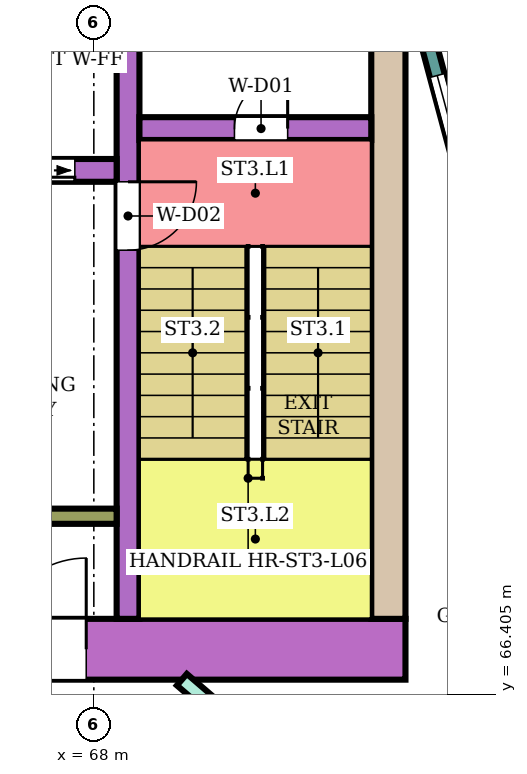
"""IFC4 building model, lengths in metres.
Left out: names, types, materials, properties, quantities, classifications, styles, units other than length and angle.
Written with IfcOpenShell. Run it as: python <this file> out.ifc"""

import sys

from ifc_helpers import new_model, si_unit, direction, frame, frame_2d, origin, place, context, subcontext, project, spatial, rectangle, extrude, element, fill, save


model = new_model("IFC4")
c1 = context("Model", 3, precision=1e-05, world=origin(), true_north=direction((0.0, 1.0)))
c2 = subcontext(c1, "Body", "Model", "MODEL_VIEW")
j1 = project(units=[si_unit("LENGTHUNIT", "METRE"), si_unit("PLANEANGLEUNIT", "RADIAN")], contexts=[c1])
p1 = place(None, origin())
s1 = spatial("IfcSite", under=j1, at=p1, CompositionType="ELEMENT")
p2 = place(p1, origin())
s2 = spatial("IfcBuilding", under=s1, at=p2, CompositionType="ELEMENT")
p3 = place(p2, frame((0.0, 0.0, 32.6)))
s3 = spatial("IfcBuildingStorey", under=s2, at=p3, CompositionType="ELEMENT", Elevation=32.6)
p4 = place(p3, frame((72.1, 67.0, 0.0), z_axis=(0.0, 0.0, 1.0), x_axis=(-1.0, 0.0, 0.0)))
e1 = element("IfcWall", 1, at=p4, inside=s3, PredefinedType="SHEAR", context=c2, shape_type="SweptSolid", body=[
    extrude(rectangle(XDim=14.7, YDim=0.8, at=frame_2d((7.35, 0.0))), origin(), (0.0, 0.0, 1.0), 3.48),
])
p5 = place(p4, frame((4.2, 0.0, 0.0)))
e2 = element("IfcOpeningElement", 2, at=p5, cuts=e1, PredefinedType="OPENING", context=c2, shape_type="SweptSolid", body=[
    extrude(rectangle(XDim=2.4, YDim=2.4, at=frame_2d((1.2, 1.2))), frame((0.0, 0.41, 0.0), z_axis=(0.0, -1.0, 0.0), x_axis=(1.0, 0.0, 0.0)), (0.0, 0.0, 1.0), 0.82),
])
p6 = place(p3, frame((71.875, 75.0, 0.0), z_axis=(0.0, 0.0, 1.0), x_axis=(0.0, -1.0, 0.0)))
e3 = element("IfcWall", 3, at=p6, inside=s3, PredefinedType="SHEAR", context=c2, shape_type="SweptSolid", body=[
    extrude(rectangle(XDim=7.6, YDim=0.45, at=frame_2d((3.8, 0.0))), origin(), (0.0, 0.0, 1.0), 3.48),
])
p7 = place(p3, frame((68.45, 75.0, 0.0), z_axis=(0.0, 0.0, 1.0), x_axis=(0.0, -1.0, 0.0)))
e4 = element("IfcWall", 4, at=p7, inside=s3, PredefinedType="SHEAR", context=c2, shape_type="SweptSolid", body=[
    extrude(rectangle(XDim=7.6, YDim=0.3, at=frame_2d((3.8, 0.0))), origin(), (0.0, 0.0, 1.0), 3.48),
])
p8 = place(p7, frame((1.85, 0.0, 0.0)))
e5 = element("IfcOpeningElement", 5, at=p8, cuts=e4, PredefinedType="OPENING", context=c2, shape_type="SweptSolid", body=[
    extrude(rectangle(XDim=0.9, YDim=2.1, at=frame_2d((0.45, 1.05))), frame((0.0, 0.16, 0.0), z_axis=(0.0, -1.0, 0.0), x_axis=(1.0, 0.0, 0.0)), (0.0, 0.0, 1.0), 0.32),
])
p9 = place(p3, frame((71.65, 73.85, 0.0), z_axis=(0.0, 0.0, 1.0), x_axis=(-1.0, 0.0, 0.0)))
e6 = element("IfcWall", 6, at=p9, inside=s3, PredefinedType="SHEAR", context=c2, shape_type="SweptSolid", body=[
    extrude(rectangle(XDim=3.05, YDim=0.3, at=frame_2d((1.525, 0.0))), origin(), (0.0, 0.0, 1.0), 3.48),
])
p10 = place(p9, frame((1.1, 0.0, 0.0)))
e7 = element("IfcOpeningElement", 7, at=p10, cuts=e6, PredefinedType="OPENING", context=c2, shape_type="SweptSolid", body=[
    extrude(rectangle(XDim=0.7, YDim=2.0, at=frame_2d((0.35, 1.0))), frame((0.0, 0.16, 0.0), z_axis=(0.0, -1.0, 0.0), x_axis=(1.0, 0.0, 0.0)), (0.0, 0.0, 1.0), 0.32),
])
p11 = place(p3, frame((68.3, 73.3, 0.0), z_axis=(0.0, 0.0, 1.0), x_axis=(-1.0, 0.0, 0.0)))
e8 = element("IfcWall", 8, at=p11, inside=s3, PredefinedType="SHEAR", context=c2, shape_type="SweptSolid", body=[
    extrude(rectangle(XDim=10.9, YDim=0.3, at=frame_2d((5.45, 0.0))), origin(), (0.0, 0.0, 1.0), 3.48),
])
p12 = place(p11, frame((0.55, 0.0, 0.0)))
e9 = element("IfcOpeningElement", 9, at=p12, cuts=e8, PredefinedType="OPENING", context=c2, shape_type="SweptSolid", body=[
    extrude(rectangle(XDim=1.1, YDim=2.1, at=frame_2d((0.55, 1.05))), frame((0.0, 0.16, 0.0), z_axis=(0.0, -1.0, 0.0), x_axis=(1.0, 0.0, 0.0)), (0.0, 0.0, 1.0), 0.32),
])
p13 = place(p11, frame((8.1, 0.0, 0.0)))
e10 = element("IfcOpeningElement", 10, at=p13, cuts=e8, PredefinedType="OPENING", context=c2, shape_type="SweptSolid", body=[
    extrude(rectangle(XDim=1.0, YDim=2.1, at=frame_2d((0.5, 1.05))), frame((0.0, 0.16, 0.0), z_axis=(0.0, -1.0, 0.0), x_axis=(1.0, 0.0, 0.0)), (0.0, 0.0, 1.0), 0.32),
])
p14 = place(p3, frame((68.3, 68.75, 0.0), z_axis=(0.0, 0.0, 1.0), x_axis=(-1.0, 0.0, 0.0)))
e11 = element("IfcWall", 11, at=p14, inside=s3, PredefinedType="SHEAR", context=c2, shape_type="SweptSolid", body=[
    extrude(rectangle(XDim=4.65, YDim=0.2, at=frame_2d((2.325, 0.0))), origin(), (0.0, 0.0, 1.0), 3.48),
])
p15 = place(p3, frame((72.396, 75.0, 0.0), z_axis=(0.0, 0.0, 1.0), x_axis=(0.258789828301, -0.965933654434, 0.0)))
e12 = element("IfcWall", 12, at=p15, inside=s3, PredefinedType="NOTDEFINED", context=c2, shape_type="SweptSolid", body=[
    extrude(rectangle(XDim=3.936, YDim=0.2, at=frame_2d((1.968, 0.0))), origin(), (0.0, 0.0, 1.0), 3.8),
])
p16 = place(p15, frame((0.468, 0.0, 0.9)))
e13 = element("IfcOpeningElement", 13, at=p16, cuts=e12, PredefinedType="OPENING", context=c2, shape_type="SweptSolid", body=[
    extrude(rectangle(XDim=3.0, YDim=2.3, at=frame_2d((1.5, 1.15))), frame((0.0, 0.11, 0.0), z_axis=(0.0, -1.0, 0.0), x_axis=(1.0, 0.0, 0.0)), (0.0, 0.0, 1.0), 0.22),
])
p17 = place(p3, frame((69.158, 66.6, 0.0), z_axis=(0.0, 0.0, 1.0), x_axis=(0.757976058094, -0.652282373943, 0.0)))
e14 = element("IfcWall", 14, at=p17, inside=s3, PredefinedType="PARTITIONING", context=c2, shape_type="SweptSolid", body=[
    extrude(rectangle(XDim=5.16, YDim=0.2, at=frame_2d((2.58, 0.0))), origin(), (0.0, 0.0, 1.0), 3.35),
])
p18 = place(p17, frame((1.6, 0.0, 0.0)))
e15 = element("IfcOpeningElement", 15, at=p18, cuts=e14, PredefinedType="OPENING", context=c2, shape_type="SweptSolid", body=[
    extrude(rectangle(XDim=1.0, YDim=2.1, at=frame_2d((0.5, 1.05))), frame((0.0, 0.11, 0.0), z_axis=(0.0, -1.0, 0.0), x_axis=(1.0, 0.0, 0.0)), (0.0, 0.0, 1.0), 0.22),
])
p19 = place(p3, frame((71.596, 64.635, 0.0), z_axis=(0.0, 0.0, 1.0), x_axis=(0.652285007511, 0.757973791748, 0.0)))
e16 = element("IfcWall", 16, at=p19, inside=s3, PredefinedType="PARTITIONING", context=c2, shape_type="SweptSolid", body=[
    extrude(rectangle(XDim=2.65, YDim=0.1, at=frame_2d((1.325, 0.0))), origin(), (0.0, 0.0, 1.0), 3.35),
])
p20 = place(p19, frame((0.6, 0.0, 0.0)))
e17 = element("IfcOpeningElement", 17, at=p20, cuts=e16, PredefinedType="OPENING", context=c2, shape_type="SweptSolid", body=[
    extrude(rectangle(XDim=0.8, YDim=2.1, at=frame_2d((0.4, 1.05))), frame((0.0, 0.06, 0.0), z_axis=(0.0, -1.0, 0.0), x_axis=(1.0, 0.0, 0.0)), (0.0, 0.0, 1.0), 0.12),
])
p21 = place(p16, origin())
e18 = element("IfcWindow", 18, at=p21, inside=s3, PartitioningType="SINGLE_PANEL", PredefinedType="WINDOW", context=c2, shape_type="SweptSolid", body=[
    extrude(rectangle(XDim=3.0, YDim=2.3, at=frame_2d((1.5, 1.15))), frame((0.0, 0.03, 0.0), z_axis=(0.0, -1.0, 0.0), x_axis=(1.0, 0.0, 0.0)), (0.0, 0.0, 1.0), 0.06),
])
fill(e13, e18)
p22 = place(p10, frame((0.7, 0.0, 0.0), z_axis=(0.0, 0.0, 1.0), x_axis=(-1.0, 0.0, 0.0)))
e19 = element("IfcDoor", 19, at=p22, inside=s3, OperationType="SINGLE_SWING_RIGHT", PredefinedType="DOOR", context=c2, shape_type="SweptSolid", body=[
    extrude(rectangle(XDim=0.7, YDim=2.0, at=frame_2d((0.35, 1.0))), frame((0.0, 0.025, 0.0), z_axis=(0.0, -1.0, 0.0), x_axis=(1.0, 0.0, 0.0)), (0.0, 0.0, 1.0), 0.05),
])
fill(e7, e19)
p23 = place(p8, origin())
e20 = element("IfcDoor", 20, at=p23, inside=s3, OperationType="SINGLE_SWING_LEFT", PredefinedType="DOOR", context=c2, shape_type="SweptSolid", body=[
    extrude(rectangle(XDim=0.9, YDim=2.1, at=frame_2d((0.45, 1.05))), frame((0.0, 0.025, 0.0), z_axis=(0.0, -1.0, 0.0), x_axis=(1.0, 0.0, 0.0)), (0.0, 0.0, 1.0), 0.05),
])
fill(e5, e20)
p24 = place(p12, origin())
e21 = element("IfcDoor", 21, at=p24, inside=s3, OperationType="DOUBLE_DOOR_SLIDING", PredefinedType="DOOR", context=c2, shape_type="SweptSolid", body=[
    extrude(rectangle(XDim=1.1, YDim=2.1, at=frame_2d((0.55, 1.05))), frame((0.0, 0.025, 0.0), z_axis=(0.0, -1.0, 0.0), x_axis=(1.0, 0.0, 0.0)), (0.0, 0.0, 1.0), 0.05),
])
fill(e9, e21)
p25 = place(p5, frame((2.4, 0.0, 0.0), z_axis=(0.0, 0.0, 1.0), x_axis=(-1.0, 0.0, 0.0)))
e22 = element("IfcDoor", 22, at=p25, inside=s3, OperationType="DOUBLE_DOOR_SINGLE_SWING", PredefinedType="DOOR", context=c2, shape_type="SweptSolid", body=[
    extrude(rectangle(XDim=2.4, YDim=2.4, at=frame_2d((1.2, 1.2))), frame((0.0, 0.025, 0.0), z_axis=(0.0, -1.0, 0.0), x_axis=(1.0, 0.0, 0.0)), (0.0, 0.0, 1.0), 0.05),
])
fill(e2, e22)
save(model, sys.argv[1])
